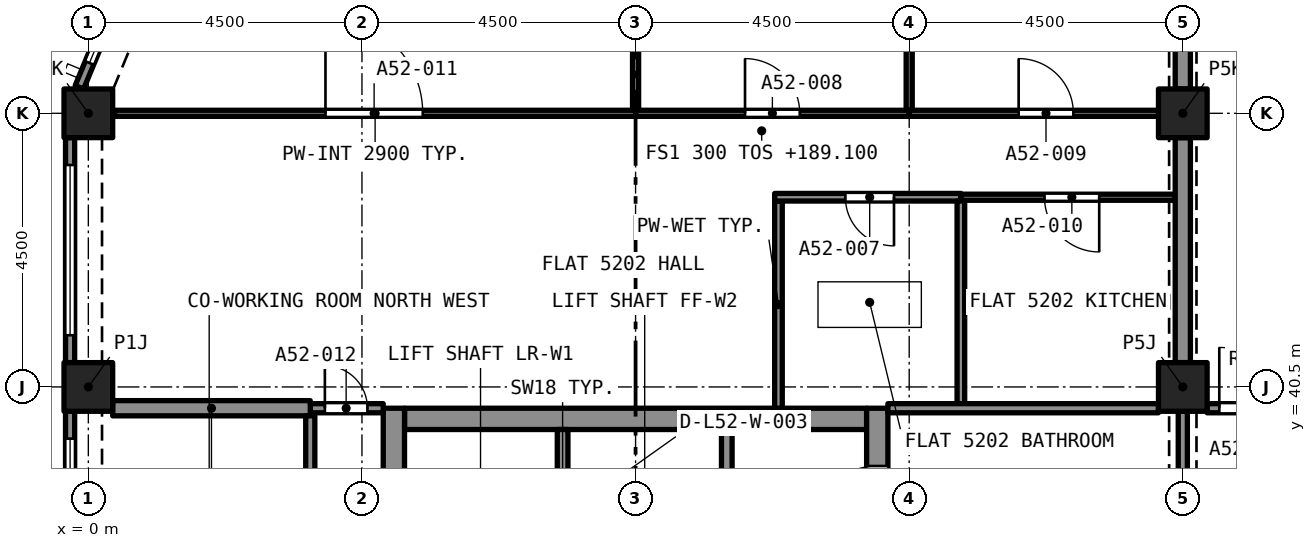
"""IFC4 building model, lengths in metres.
Left out: names, types, materials, properties, quantities, classifications, styles, units other than length and angle.
Written with IfcOpenShell. Run it as: python <this file> out.ifc"""

import sys

from ifc_helpers import new_model, si_unit, direction, frame, frame_2d, origin, origin_2d, place, context, subcontext, project, spatial, rectangle, extrude, element, fill, save


model = new_model("IFC4")
c1 = context("Model", 3, precision=1e-05, world=origin(), true_north=direction((0.0, 1.0)))
c2 = subcontext(c1, "Body", "Model", "MODEL_VIEW")
j1 = project(units=[si_unit("LENGTHUNIT", "METRE"), si_unit("PLANEANGLEUNIT", "RADIAN")], contexts=[c1])
p1 = place(None, origin())
s1 = spatial("IfcSite", under=j1, at=p1, CompositionType="ELEMENT")
p2 = place(p1, origin())
s2 = spatial("IfcBuilding", under=s1, at=p2, CompositionType="ELEMENT")
p3 = place(p2, frame((0.0, 0.0, 189.1)))
s3 = spatial("IfcBuildingStorey", under=s2, at=p3, CompositionType="ELEMENT", Elevation=189.1)
for number, where, z_axis, x_axis in (
    (1, (0.0, 40.5, 0.0), (0.0, 0.0, 1.0), (1.0, 0.0, 0.0)),
    (2, (18.0, 40.5, 0.0), (0.0, 0.0, 1.0), (1.0, 0.0, 0.0)),
    (3, (0.0, 45.0, 0.0), (0.0, 0.0, 1.0), (1.0, 0.0, 0.0)),
    (4, (18.0, 45.0, 0.0), (0.0, 0.0, 1.0), (1.0, 0.0, 0.0)),
):
    element("IfcColumn", number, at=place(p3, frame(where, z_axis=z_axis, x_axis=x_axis)), inside=s3, PredefinedType="COLUMN", context=c2, shape_type="SweptSolid", body=[
        extrude(rectangle(XDim=0.8, YDim=0.8, at=origin_2d()), origin(), (0.0, 0.0, 1.0), 3.2),
    ])
p4 = place(p3, frame((5.2, 39.975, 0.0), z_axis=(0.0, 0.0, 1.0), x_axis=(1.0, 0.0, 0.0)))
e5 = element("IfcWall", 5, at=p4, inside=s3, PredefinedType="SOLIDWALL", context=c2, shape_type="SweptSolid", body=[
    extrude(rectangle(XDim=7.6, YDim=0.35, at=frame_2d((3.8, 0.0))), origin(), (0.0, 0.0, 1.0), 3.2),
])
p5 = place(p3, frame((5.025, 27.35, 0.0), z_axis=(0.0, 0.0, 1.0), x_axis=(0.0, 1.0, 0.0)))
e6 = element("IfcWall", 6, at=p5, inside=s3, PredefinedType="SOLIDWALL", context=c2, shape_type="SweptSolid", body=[
    extrude(rectangle(XDim=12.8, YDim=0.35, at=frame_2d((6.4, 0.0))), origin(), (0.0, 0.0, 1.0), 3.2),
])
p6 = place(p5, frame((8.6, 0.0, 0.0)))
e7 = element("IfcOpeningElement", 7, at=p6, cuts=e6, PredefinedType="OPENING", context=c2, shape_type="SweptSolid", body=[
    extrude(rectangle(XDim=1.2, YDim=2.1, at=frame_2d((0.6, 1.05))), frame((0.0, 0.185, 0.0), z_axis=(0.0, -1.0, 0.0), x_axis=(1.0, 0.0, 0.0)), (0.0, 0.0, 1.0), 0.37),
])
p7 = place(p3, frame((12.975, 27.35, 0.0), z_axis=(0.0, 0.0, 1.0), x_axis=(0.0, 1.0, 0.0)))
e8 = element("IfcWall", 8, at=p7, inside=s3, PredefinedType="SOLIDWALL", context=c2, shape_type="SweptSolid", body=[
    extrude(rectangle(XDim=12.8, YDim=0.35, at=frame_2d((6.4, 0.0))), origin(), (0.0, 0.0, 1.0), 3.2),
])
p8 = place(p7, frame((10.75, 0.0, 0.0)))
e9 = element("IfcOpeningElement", 9, at=p8, cuts=e8, PredefinedType="OPENING", context=c2, shape_type="SweptSolid", body=[
    extrude(rectangle(XDim=1.1, YDim=2.1, at=frame_2d((0.55, 1.05))), frame((0.0, 0.185, 0.0), z_axis=(0.0, -1.0, 0.0), x_axis=(1.0, 0.0, 0.0)), (0.0, 0.0, 1.0), 0.37),
])
p9 = place(p7, frame((8.6, 0.0, 0.0)))
e10 = element("IfcOpeningElement", 10, at=p9, cuts=e8, PredefinedType="OPENING", context=c2, shape_type="SweptSolid", body=[
    extrude(rectangle(XDim=1.2, YDim=2.1, at=frame_2d((0.6, 1.05))), frame((0.0, 0.185, 0.0), z_axis=(0.0, -1.0, 0.0), x_axis=(1.0, 0.0, 0.0)), (0.0, 0.0, 1.0), 0.37),
])
p10 = place(p3, frame((-0.147, 45.429, 0.0), z_axis=(0.0, 0.0, 1.0), x_axis=(0.382669406082, 0.923885342263, 0.0)))
e11 = element("IfcWall", 11, at=p10, inside=s3, PredefinedType="SOLIDWALL", context=c2, shape_type="SweptSolid", body=[
    extrude(rectangle(XDim=2.602, YDim=0.15, at=frame_2d((1.301, 0.0))), origin(), (0.0, 0.0, 1.0), 3.2),
])
p11 = place(p10, frame((0.432, 0.0, 0.45)))
e12 = element("IfcOpeningElement", 12, at=p11, cuts=e11, PredefinedType="OPENING", context=c2, shape_type="SweptSolid", body=[
    extrude(rectangle(XDim=1.9, YDim=1.95, at=frame_2d((0.95, 0.975))), frame((0.0, 0.085, 0.0), z_axis=(0.0, -1.0, 0.0), x_axis=(1.0, 0.0, 0.0)), (0.0, 0.0, 1.0), 0.17),
])
p12 = place(p3, frame((-0.3, 40.9, 0.0), z_axis=(0.0, 0.0, 1.0), x_axis=(0.0, 1.0, 0.0)))
e13 = element("IfcWall", 13, at=p12, inside=s3, PredefinedType="SOLIDWALL", context=c2, shape_type="SweptSolid", body=[
    extrude(rectangle(XDim=3.7, YDim=0.15, at=frame_2d((1.85, 0.0))), origin(), (0.0, 0.0, 1.0), 3.2),
])
p13 = place(p12, frame((0.45, 0.0, 0.45)))
e14 = element("IfcOpeningElement", 14, at=p13, cuts=e13, PredefinedType="OPENING", context=c2, shape_type="SweptSolid", body=[
    extrude(rectangle(XDim=2.8, YDim=1.95, at=frame_2d((1.4, 0.975))), frame((0.0, 0.085, 0.0), z_axis=(0.0, -1.0, 0.0), x_axis=(1.0, 0.0, 0.0)), (0.0, 0.0, 1.0), 0.17),
])
p14 = place(p3, frame((-0.3, 36.4, 0.0), z_axis=(0.0, 0.0, 1.0), x_axis=(0.0, 1.0, 0.0)))
e15 = element("IfcWall", 15, at=p14, inside=s3, PredefinedType="SOLIDWALL", context=c2, shape_type="SweptSolid", body=[
    extrude(rectangle(XDim=3.7, YDim=0.15, at=frame_2d((1.85, 0.0))), origin(), (0.0, 0.0, 1.0), 3.2),
])
p15 = place(p14, frame((0.45, 0.0, 0.45)))
e16 = element("IfcOpeningElement", 16, at=p15, cuts=e15, PredefinedType="OPENING", context=c2, shape_type="SweptSolid", body=[
    extrude(rectangle(XDim=2.8, YDim=1.95, at=frame_2d((1.4, 0.975))), frame((0.0, 0.085, 0.0), z_axis=(0.0, -1.0, 0.0), x_axis=(1.0, 0.0, 0.0)), (0.0, 0.0, 1.0), 0.17),
])
p16 = place(p3, frame((11.35, 40.15, 0.0), z_axis=(0.0, 0.0, 1.0), x_axis=(0.0, 1.0, 0.0)))
e17 = element("IfcWall", 17, at=p16, inside=s3, PredefinedType="PARTITIONING", context=c2, shape_type="SweptSolid", body=[
    extrude(rectangle(XDim=3.408, YDim=0.125, at=frame_2d((1.704, 0.0))), origin(), (0.0, 0.0, 1.0), 2.9),
])
p17 = place(p3, frame((14.35, 43.62, 0.0), z_axis=(0.0, 0.0, 1.0), x_axis=(-1.0, 0.0, 0.0)))
e18 = element("IfcWall", 18, at=p17, inside=s3, PredefinedType="PARTITIONING", context=c2, shape_type="SweptSolid", body=[
    extrude(rectangle(XDim=3.063, YDim=0.125, at=frame_2d((1.531, 0.0))), origin(), (0.0, 0.0, 1.0), 2.9),
])
p18 = place(p17, frame((1.1, 0.0, 0.0)))
e19 = element("IfcOpeningElement", 19, at=p18, cuts=e18, PredefinedType="OPENING", context=c2, shape_type="SweptSolid", body=[
    extrude(rectangle(XDim=0.8, YDim=2.1, at=frame_2d((0.4, 1.05))), frame((0.0, 0.073, 0.0), z_axis=(0.0, -1.0, 0.0), x_axis=(1.0, 0.0, 0.0)), (0.0, 0.0, 1.0), 0.145),
])
p19 = place(p3, frame((14.35, 40.225, 0.0), z_axis=(0.0, 0.0, 1.0), x_axis=(0.0, 1.0, 0.0)))
e20 = element("IfcWall", 20, at=p19, inside=s3, PredefinedType="PARTITIONING", context=c2, shape_type="SweptSolid", body=[
    extrude(rectangle(XDim=3.333, YDim=0.125, at=frame_2d((1.666, 0.0))), origin(), (0.0, 0.0, 1.0), 2.9),
])
p20 = place(p3, frame((13.15, 40.15, 0.0), z_axis=(0.0, 0.0, 1.0), x_axis=(1.0, 0.0, 0.0)))
e21 = element("IfcWall", 21, at=p20, inside=s3, PredefinedType="PARTITIONING", context=c2, shape_type="SweptSolid", body=[
    extrude(rectangle(XDim=4.45, YDim=0.15, at=frame_2d((2.225, 0.0))), origin(), (0.0, 0.0, 1.0), 2.9),
])
p21 = place(p3, frame((13.5, 45.05, 0.0), z_axis=(0.0, 0.0, 1.0), x_axis=(0.0, 1.0, 0.0)))
e22 = element("IfcWall", 22, at=p21, inside=s3, PredefinedType="PARTITIONING", context=c2, shape_type="SweptSolid", body=[
    extrude(rectangle(XDim=4.05, YDim=0.1, at=frame_2d((2.025, 0.0))), origin(), (0.0, 0.0, 1.0), 2.9),
])
p22 = place(p3, frame((9.0, 45.0, 0.0), z_axis=(0.0, 0.0, 1.0), x_axis=(1.0, 0.0, 0.0)))
e23 = element("IfcWall", 23, at=p22, inside=s3, PredefinedType="PARTITIONING", context=c2, shape_type="SweptSolid", body=[
    extrude(rectangle(XDim=4.5, YDim=0.1, at=frame_2d((2.25, 0.0))), origin(), (0.0, 0.0, 1.0), 2.9),
])
p23 = place(p22, frame((1.8, 0.0, 0.0)))
e24 = element("IfcOpeningElement", 24, at=p23, cuts=e23, PredefinedType="OPENING", context=c2, shape_type="SweptSolid", body=[
    extrude(rectangle(XDim=0.9, YDim=2.1, at=frame_2d((0.45, 1.05))), frame((0.0, 0.06, 0.0), z_axis=(0.0, -1.0, 0.0), x_axis=(1.0, 0.0, 0.0)), (0.0, 0.0, 1.0), 0.12),
])
p24 = place(p3, frame((9.0, 45.05, 0.0), z_axis=(0.0, 0.0, 1.0), x_axis=(0.0, 1.0, 0.0)))
e25 = element("IfcWall", 25, at=p24, inside=s3, PredefinedType="PARTITIONING", context=c2, shape_type="SweptSolid", body=[
    extrude(rectangle(XDim=4.05, YDim=0.1, at=frame_2d((2.025, 0.0))), origin(), (0.0, 0.0, 1.0), 2.9),
])
p25 = place(p3, frame((13.5, 45.0, 0.0), z_axis=(0.0, 0.0, 1.0), x_axis=(1.0, 0.0, 0.0)))
e26 = element("IfcWall", 26, at=p25, inside=s3, PredefinedType="PARTITIONING", context=c2, shape_type="SweptSolid", body=[
    extrude(rectangle(XDim=4.1, YDim=0.1, at=frame_2d((2.05, 0.0))), origin(), (0.0, 0.0, 1.0), 2.9),
])
p26 = place(p25, frame((1.8, 0.0, 0.0)))
e27 = element("IfcOpeningElement", 27, at=p26, cuts=e26, PredefinedType="OPENING", context=c2, shape_type="SweptSolid", body=[
    extrude(rectangle(XDim=0.9, YDim=2.1, at=frame_2d((0.45, 1.05))), frame((0.0, 0.06, 0.0), z_axis=(0.0, -1.0, 0.0), x_axis=(1.0, 0.0, 0.0)), (0.0, 0.0, 1.0), 0.12),
])
p27 = place(p3, frame((18.0, 45.4, 0.0), z_axis=(0.0, 0.0, 1.0), x_axis=(0.0, 1.0, 0.0)))
e28 = element("IfcWall", 28, at=p27, inside=s3, PredefinedType="PARTITIONING", context=c2, shape_type="SweptSolid", body=[
    extrude(rectangle(XDim=3.7, YDim=0.25, at=frame_2d((1.85, 0.0))), origin(), (0.0, 0.0, 1.0), 2.38),
])
p28 = place(p3, frame((17.875, 43.62, 0.0), z_axis=(0.0, 0.0, 1.0), x_axis=(-1.0, 0.0, 0.0)))
e29 = element("IfcWall", 29, at=p28, inside=s3, PredefinedType="PARTITIONING", context=c2, shape_type="SweptSolid", body=[
    extrude(rectangle(XDim=3.525, YDim=0.1, at=frame_2d((1.762, 0.0))), origin(), (0.0, 0.0, 1.0), 2.9),
])
p29 = place(p28, frame((1.25, 0.0, 0.0)))
e30 = element("IfcOpeningElement", 30, at=p29, cuts=e29, PredefinedType="OPENING", context=c2, shape_type="SweptSolid", body=[
    extrude(rectangle(XDim=0.9, YDim=2.1, at=frame_2d((0.45, 1.05))), frame((0.0, 0.06, 0.0), z_axis=(0.0, -1.0, 0.0), x_axis=(1.0, 0.0, 0.0)), (0.0, 0.0, 1.0), 0.12),
])
p30 = place(p3, frame((0.433, 45.0, 0.0), z_axis=(0.0, 0.0, 1.0), x_axis=(1.0, 0.0, 0.0)))
e31 = element("IfcWall", 31, at=p30, inside=s3, PredefinedType="PARTITIONING", context=c2, shape_type="SweptSolid", body=[
    extrude(rectangle(XDim=8.567, YDim=0.1, at=frame_2d((4.284, 0.0))), origin(), (0.0, 0.0, 1.0), 2.9),
])
p31 = place(p30, frame((3.467, 0.0, 0.0)))
e32 = element("IfcOpeningElement", 32, at=p31, cuts=e31, PredefinedType="OPENING", context=c2, shape_type="SweptSolid", body=[
    extrude(rectangle(XDim=1.6, YDim=2.1, at=frame_2d((0.8, 1.05))), frame((0.0, 0.06, 0.0), z_axis=(0.0, -1.0, 0.0), x_axis=(1.0, 0.0, 0.0)), (0.0, 0.0, 1.0), 0.12),
])
p32 = place(p3, frame((3.65, 40.15, 0.0), z_axis=(0.0, 0.0, 1.0), x_axis=(1.0, 0.0, 0.0)))
e33 = element("IfcWall", 33, at=p32, inside=s3, PredefinedType="PARTITIONING", context=c2, shape_type="SweptSolid", body=[
    extrude(rectangle(XDim=1.2, YDim=0.15, at=frame_2d((0.6, 0.0))), origin(), (0.0, 0.0, 1.0), 2.9),
])
p33 = place(p32, frame((0.24, 0.0, 0.0)))
e34 = element("IfcOpeningElement", 34, at=p33, cuts=e33, PredefinedType="OPENING", context=c2, shape_type="SweptSolid", body=[
    extrude(rectangle(XDim=0.7, YDim=2.1, at=frame_2d((0.35, 1.05))), frame((0.0, 0.085, 0.0), z_axis=(0.0, -1.0, 0.0), x_axis=(1.0, 0.0, 0.0)), (0.0, 0.0, 1.0), 0.17),
])
p34 = place(p3, frame((0.4, 40.15, 0.0), z_axis=(0.0, 0.0, 1.0), x_axis=(1.0, 0.0, 0.0)))
e35 = element("IfcWall", 35, at=p34, inside=s3, PredefinedType="PARTITIONING", context=c2, shape_type="SweptSolid", body=[
    extrude(rectangle(XDim=3.25, YDim=0.25, at=frame_2d((1.625, 0.0))), origin(), (0.0, 0.0, 1.0), 2.9),
])
p35 = place(p3, frame((18.0, 40.9, 0.0), z_axis=(0.0, 0.0, 1.0), x_axis=(0.0, 1.0, 0.0)))
e36 = element("IfcWall", 36, at=p35, inside=s3, PredefinedType="PARTITIONING", context=c2, shape_type="SweptSolid", body=[
    extrude(rectangle(XDim=3.7, YDim=0.25, at=frame_2d((1.85, 0.0))), origin(), (0.0, 0.0, 1.0), 2.38),
])
p36 = place(p3, frame((18.4, 40.15, 0.0), z_axis=(0.0, 0.0, 1.0), x_axis=(1.0, 0.0, 0.0)))
e37 = element("IfcWall", 37, at=p36, inside=s3, PredefinedType="PARTITIONING", context=c2, shape_type="SweptSolid", body=[
    extrude(rectangle(XDim=2.2, YDim=0.15, at=frame_2d((1.1, 0.0))), origin(), (0.0, 0.0, 1.0), 2.75),
])
p37 = place(p36, frame((0.2, 0.0, 0.0)))
e38 = element("IfcOpeningElement", 38, at=p37, cuts=e37, PredefinedType="OPENING", context=c2, shape_type="SweptSolid", body=[
    extrude(rectangle(XDim=1.0, YDim=2.1, at=frame_2d((0.5, 1.05))), frame((0.0, 0.085, 0.0), z_axis=(0.0, -1.0, 0.0), x_axis=(1.0, 0.0, 0.0)), (0.0, 0.0, 1.0), 0.17),
])
p38 = place(p3, frame((18.0, 40.1, 0.0), z_axis=(0.0, 0.0, 1.0), x_axis=(0.0, -1.0, 0.0)))
e39 = element("IfcWall", 39, at=p38, inside=s3, PredefinedType="PARTITIONING", context=c2, shape_type="SweptSolid", body=[
    extrude(rectangle(XDim=3.7, YDim=0.15, at=frame_2d((1.85, 0.0))), origin(), (0.0, 0.0, 1.0), 2.38),
])
p39 = place(p38, frame((1.25, 0.0, 0.0)))
e40 = element("IfcOpeningElement", 40, at=p39, cuts=e39, PredefinedType="OPENING", context=c2, shape_type="SweptSolid", body=[
    extrude(rectangle(XDim=1.2, YDim=2.1, at=frame_2d((0.6, 1.05))), frame((0.0, 0.085, 0.0), z_axis=(0.0, -1.0, 0.0), x_axis=(1.0, 0.0, 0.0)), (0.0, 0.0, 1.0), 0.17),
])
p40 = place(p3, frame((3.65, 36.0, 0.0), z_axis=(0.0, 0.0, 1.0), x_axis=(0.0, 1.0, 0.0)))
e41 = element("IfcWall", 41, at=p40, inside=s3, PredefinedType="PARTITIONING", context=c2, shape_type="SweptSolid", body=[
    extrude(rectangle(XDim=4.025, YDim=0.15, at=frame_2d((2.012, 0.0))), origin(), (0.0, 0.0, 1.0), 2.9),
])
p41 = place(p40, frame((1.575, 0.0, 0.0)))
e42 = element("IfcOpeningElement", 42, at=p41, cuts=e41, PredefinedType="OPENING", context=c2, shape_type="SweptSolid", body=[
    extrude(rectangle(XDim=1.0, YDim=2.1, at=frame_2d((0.5, 1.05))), frame((0.0, 0.085, 0.0), z_axis=(0.0, -1.0, 0.0), x_axis=(1.0, 0.0, 0.0)), (0.0, 0.0, 1.0), 0.17),
])
p42 = place(p3, frame((7.8, 37.5, 0.0), z_axis=(0.0, 0.0, 1.0), x_axis=(0.0, 1.0, 0.0)))
e43 = element("IfcWall", 43, at=p42, inside=s3, PredefinedType="SOLIDWALL", context=c2, shape_type="SweptSolid", body=[
    extrude(rectangle(XDim=2.3, YDim=0.175, at=frame_2d((1.15, 0.0))), origin(), (0.0, 0.0, 1.0), 2.9),
])
p43 = place(p3, frame((10.5, 37.5, 0.0), z_axis=(0.0, 0.0, 1.0), x_axis=(0.0, 1.0, 0.0)))
e44 = element("IfcWall", 44, at=p43, inside=s3, PredefinedType="SOLIDWALL", context=c2, shape_type="SweptSolid", body=[
    extrude(rectangle(XDim=2.3, YDim=0.175, at=frame_2d((1.15, 0.0))), origin(), (0.0, 0.0, 1.0), 2.9),
])
p44 = place(p43, frame((0.65, 0.0, 0.0)))
e45 = element("IfcOpeningElement", 45, at=p44, cuts=e44, PredefinedType="OPENING", context=c2, shape_type="SweptSolid", body=[
    extrude(rectangle(XDim=1.0, YDim=2.1, at=frame_2d((0.5, 1.05))), frame((0.0, 0.097, 0.0), z_axis=(0.0, -1.0, 0.0), x_axis=(1.0, 0.0, 0.0)), (0.0, 0.0, 1.0), 0.195),
])
p45 = place(p11, origin())
e46 = element("IfcWindow", 46, at=p45, inside=s3, PartitioningType="SINGLE_PANEL", PredefinedType="WINDOW", context=c2, shape_type="SweptSolid", body=[
    extrude(rectangle(XDim=1.9, YDim=1.95, at=frame_2d((0.95, 0.975))), frame((0.0, 0.03, 0.0), z_axis=(0.0, -1.0, 0.0), x_axis=(1.0, 0.0, 0.0)), (0.0, 0.0, 1.0), 0.06),
])
fill(e12, e46)
p46 = place(p13, origin())
e47 = element("IfcWindow", 47, at=p46, inside=s3, PartitioningType="SINGLE_PANEL", PredefinedType="WINDOW", context=c2, shape_type="SweptSolid", body=[
    extrude(rectangle(XDim=2.8, YDim=1.95, at=frame_2d((1.4, 0.975))), frame((0.0, 0.03, 0.0), z_axis=(0.0, -1.0, 0.0), x_axis=(1.0, 0.0, 0.0)), (0.0, 0.0, 1.0), 0.06),
])
fill(e14, e47)
p47 = place(p15, origin())
e48 = element("IfcWindow", 48, at=p47, inside=s3, PartitioningType="SINGLE_PANEL", PredefinedType="WINDOW", context=c2, shape_type="SweptSolid", body=[
    extrude(rectangle(XDim=2.8, YDim=1.95, at=frame_2d((1.4, 0.975))), frame((0.0, 0.03, 0.0), z_axis=(0.0, -1.0, 0.0), x_axis=(1.0, 0.0, 0.0)), (0.0, 0.0, 1.0), 0.06),
])
fill(e16, e48)
p48 = place(p18, origin())
e49 = element("IfcDoor", 49, at=p48, inside=s3, OperationType="SINGLE_SWING_LEFT", PredefinedType="DOOR", context=c2, shape_type="SweptSolid", body=[
    extrude(rectangle(XDim=0.8, YDim=2.1, at=frame_2d((0.4, 1.05))), frame((0.0, 0.025, 0.0), z_axis=(0.0, -1.0, 0.0), x_axis=(1.0, 0.0, 0.0)), (0.0, 0.0, 1.0), 0.05),
])
fill(e19, e49)
p49 = place(p23, origin())
e50 = element("IfcDoor", 50, at=p49, inside=s3, OperationType="SINGLE_SWING_LEFT", PredefinedType="DOOR", context=c2, shape_type="SweptSolid", body=[
    extrude(rectangle(XDim=0.9, YDim=2.1, at=frame_2d((0.45, 1.05))), frame((0.0, 0.025, 0.0), z_axis=(0.0, -1.0, 0.0), x_axis=(1.0, 0.0, 0.0)), (0.0, 0.0, 1.0), 0.05),
])
fill(e24, e50)
p50 = place(p26, origin())
e51 = element("IfcDoor", 51, at=p50, inside=s3, OperationType="SINGLE_SWING_RIGHT", PredefinedType="DOOR", context=c2, shape_type="SweptSolid", body=[
    extrude(rectangle(XDim=0.9, YDim=2.1, at=frame_2d((0.45, 1.05))), frame((0.0, 0.025, 0.0), z_axis=(0.0, -1.0, 0.0), x_axis=(1.0, 0.0, 0.0)), (0.0, 0.0, 1.0), 0.05),
])
fill(e27, e51)
p51 = place(p29, origin())
e52 = element("IfcDoor", 52, at=p51, inside=s3, OperationType="SINGLE_SWING_LEFT", PredefinedType="DOOR", context=c2, shape_type="SweptSolid", body=[
    extrude(rectangle(XDim=0.9, YDim=2.1, at=frame_2d((0.45, 1.05))), frame((0.0, 0.025, 0.0), z_axis=(0.0, -1.0, 0.0), x_axis=(1.0, 0.0, 0.0)), (0.0, 0.0, 1.0), 0.05),
])
fill(e30, e52)
p52 = place(p31, origin())
e53 = element("IfcDoor", 53, at=p52, inside=s3, OperationType="SINGLE_SWING_LEFT", PredefinedType="DOOR", context=c2, shape_type="SweptSolid", body=[
    extrude(rectangle(XDim=1.6, YDim=2.1, at=frame_2d((0.8, 1.05))), frame((0.0, 0.025, 0.0), z_axis=(0.0, -1.0, 0.0), x_axis=(1.0, 0.0, 0.0)), (0.0, 0.0, 1.0), 0.05),
])
fill(e32, e53)
p53 = place(p33, origin())
e54 = element("IfcDoor", 54, at=p53, inside=s3, OperationType="SINGLE_SWING_LEFT", PredefinedType="DOOR", context=c2, shape_type="SweptSolid", body=[
    extrude(rectangle(XDim=0.7, YDim=2.1, at=frame_2d((0.35, 1.05))), frame((0.0, 0.025, 0.0), z_axis=(0.0, -1.0, 0.0), x_axis=(1.0, 0.0, 0.0)), (0.0, 0.0, 1.0), 0.05),
])
fill(e34, e54)
p54 = place(p37, origin())
e55 = element("IfcDoor", 55, at=p54, inside=s3, OperationType="SINGLE_SWING_LEFT", PredefinedType="DOOR", context=c2, shape_type="SweptSolid", body=[
    extrude(rectangle(XDim=1.0, YDim=2.1, at=frame_2d((0.5, 1.05))), frame((0.0, 0.025, 0.0), z_axis=(0.0, -1.0, 0.0), x_axis=(1.0, 0.0, 0.0)), (0.0, 0.0, 1.0), 0.05),
])
fill(e38, e55)
p55 = place(p8, origin())
e56 = element("IfcDoor", 56, at=p55, inside=s3, OperationType="SINGLE_SWING_LEFT", PredefinedType="DOOR", context=c2, shape_type="SweptSolid", body=[
    extrude(rectangle(XDim=1.1, YDim=2.1, at=frame_2d((0.55, 1.05))), frame((0.0, 0.025, 0.0), z_axis=(0.0, -1.0, 0.0), x_axis=(1.0, 0.0, 0.0)), (0.0, 0.0, 1.0), 0.05),
])
fill(e9, e56)
save(model, sys.argv[1])
